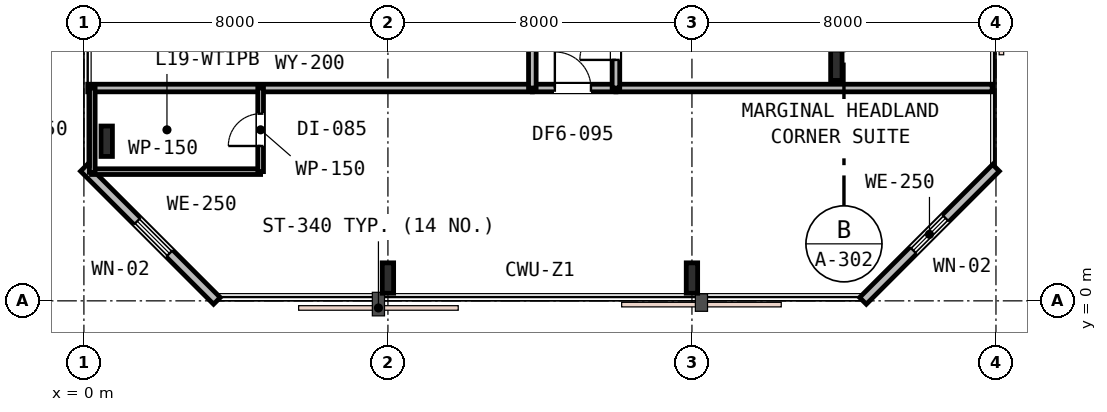
"""IFC4 building model, lengths in metres.
Left out: names, types, materials, properties, quantities, classifications, styles, units other than length and angle.
Written with IfcOpenShell. Run it as: python <this file> out.ifc"""

import sys

from ifc_helpers import new_model, si_unit, direction, frame, frame_2d, origin, origin_2d, place, context, subcontext, project, spatial, rectangle, i_section, extrude, element, fill, save


model = new_model("IFC4")
c1 = context("Model", 3, precision=1e-05, world=origin(), true_north=direction((0.0, 1.0)))
c2 = subcontext(c1, "Body", "Model", "MODEL_VIEW")
j1 = project(units=[si_unit("LENGTHUNIT", "METRE"), si_unit("PLANEANGLEUNIT", "RADIAN")], contexts=[c1])
p1 = place(None, origin())
s1 = spatial("IfcSite", under=j1, at=p1, CompositionType="ELEMENT")
p2 = place(p1, origin())
s2 = spatial("IfcBuilding", under=s1, at=p2, CompositionType="ELEMENT")
p3 = place(p2, frame((0.0, 0.0, 76.2)))
s3 = spatial("IfcBuildingStorey", under=s2, at=p3, CompositionType="ELEMENT", Elevation=76.2)
for number, where, z_axis, x_axis in (
    (1, (0.6, 4.2, 0.0), (0.0, 0.0, 1.0), (1.0, 0.0, 0.0)),
    (2, (8.0, 0.6, 0.0), (0.0, 0.0, 1.0), (1.0, 0.0, 0.0)),
    (3, (16.0, 0.6, 0.0), (0.0, 0.0, 1.0), (1.0, 0.0, 0.0)),
    (4, (19.8, 6.2, 0.0), (0.0, 0.0, 1.0), (1.0, 0.0, 0.0)),
):
    element("IfcColumn", number, at=place(p3, frame(where, z_axis=z_axis, x_axis=x_axis)), inside=s3, PredefinedType="COLUMN", context=c2, shape_type="SweptSolid", body=[
        extrude(i_section(OverallWidth=0.3, OverallDepth=0.8, WebThickness=0.018, FlangeThickness=0.033, FilletRadius=0.03, at=origin_2d()), origin(), (0.0, 0.0, 1.0), 3.6),
    ])
p4 = place(p3, frame((20.5, 0.0, 0.0), z_axis=(0.0, 0.0, 1.0), x_axis=(0.707106781187, 0.707106781187, 0.0)))
e5 = element("IfcWall", 5, at=p4, inside=s3, PredefinedType="STANDARD", context=c2, shape_type="SweptSolid", body=[
    extrude(rectangle(XDim=4.95, YDim=0.25, at=frame_2d((2.475, 0.0))), origin(), (0.0, 0.0, 1.0), 3.24),
])
p5 = place(p4, frame((1.875, 0.0, 0.85)))
e6 = element("IfcOpeningElement", 6, at=p5, cuts=e5, PredefinedType="OPENING", context=c2, shape_type="SweptSolid", body=[
    extrude(rectangle(XDim=1.2, YDim=1.6, at=frame_2d((0.6, 0.8))), frame((0.0, 0.135, 0.0), z_axis=(0.0, -1.0, 0.0), x_axis=(1.0, 0.0, 0.0)), (0.0, 0.0, 1.0), 0.27),
])
p6 = place(p3, frame((0.0, 3.5, 0.0), z_axis=(0.0, 0.0, 1.0), x_axis=(0.707106781187, -0.707106781187, 0.0)))
e7 = element("IfcWall", 7, at=p6, inside=s3, PredefinedType="STANDARD", context=c2, shape_type="SweptSolid", body=[
    extrude(rectangle(XDim=4.95, YDim=0.25, at=frame_2d((2.475, 0.0))), origin(), (0.0, 0.0, 1.0), 3.24),
])
p7 = place(p6, frame((1.985, 0.0, 0.85)))
e8 = element("IfcOpeningElement", 8, at=p7, cuts=e7, PredefinedType="OPENING", context=c2, shape_type="SweptSolid", body=[
    extrude(rectangle(XDim=1.2, YDim=1.6, at=frame_2d((0.6, 0.8))), frame((0.0, 0.135, 0.0), z_axis=(0.0, -1.0, 0.0), x_axis=(1.0, 0.0, 0.0)), (0.0, 0.0, 1.0), 0.27),
])
p8 = place(p3, frame((0.1, 5.6, 0.0), z_axis=(0.0, 0.0, 1.0), x_axis=(1.0, 0.0, 0.0)))
e9 = element("IfcWall", 9, at=p8, inside=s3, PredefinedType="PARTITIONING", context=c2, shape_type="SweptSolid", body=[
    extrude(rectangle(XDim=11.7, YDim=0.2, at=frame_2d((5.85, 0.0))), origin(), (0.0, 0.0, 1.0), 2.83),
])
p9 = place(p3, frame((14.0, 5.6, 0.0), z_axis=(0.0, 0.0, 1.0), x_axis=(1.0, 0.0, 0.0)))
e10 = element("IfcWall", 10, at=p9, inside=s3, PredefinedType="PARTITIONING", context=c2, shape_type="SweptSolid", body=[
    extrude(rectangle(XDim=9.9, YDim=0.2, at=frame_2d((4.95, 0.0))), origin(), (0.0, 0.0, 1.0), 2.74),
])
p10 = place(p3, frame((11.8, 5.6, 0.0), z_axis=(0.0, 0.0, 1.0), x_axis=(1.0, 0.0, 0.0)))
e11 = element("IfcWall", 11, at=p10, inside=s3, PredefinedType="PARTITIONING", context=c2, shape_type="SweptSolid", body=[
    extrude(rectangle(XDim=2.2, YDim=0.2, at=frame_2d((1.1, 0.0))), origin(), (0.0, 0.0, 1.0), 3.24),
])
p11 = place(p10, frame((0.593, 0.0, 0.0)))
e12 = element("IfcOpeningElement", 12, at=p11, cuts=e11, PredefinedType="OPENING", context=c2, shape_type="SweptSolid", body=[
    extrude(rectangle(XDim=0.95, YDim=2.15, at=frame_2d((0.475, 1.075))), frame((0.0, 0.11, 0.0), z_axis=(0.0, -1.0, 0.0), x_axis=(1.0, 0.0, 0.0)), (0.0, 0.0, 1.0), 0.22),
])
p12 = place(p3, frame((0.2, 3.4, 0.0), z_axis=(0.0, 0.0, 1.0), x_axis=(1.0, 0.0, 0.0)))
e13 = element("IfcWall", 13, at=p12, inside=s3, PredefinedType="PARTITIONING", context=c2, shape_type="SweptSolid", body=[
    extrude(rectangle(XDim=4.45, YDim=0.15, at=frame_2d((2.225, 0.0))), origin(), (0.0, 0.0, 1.0), 3.24),
])
p13 = place(p3, frame((4.65, 3.4, 0.0), z_axis=(0.0, 0.0, 1.0), x_axis=(0.0, 1.0, 0.0)))
e14 = element("IfcWall", 14, at=p13, inside=s3, PredefinedType="PARTITIONING", context=c2, shape_type="SweptSolid", body=[
    extrude(rectangle(XDim=2.2, YDim=0.15, at=frame_2d((1.1, 0.0))), origin(), (0.0, 0.0, 1.0), 3.24),
])
p14 = place(p13, frame((0.675, 0.0, 0.0)))
e15 = element("IfcOpeningElement", 15, at=p14, cuts=e14, PredefinedType="OPENING", context=c2, shape_type="SweptSolid", body=[
    extrude(rectangle(XDim=0.85, YDim=2.15, at=frame_2d((0.425, 1.075))), frame((0.0, 0.085, 0.0), z_axis=(0.0, -1.0, 0.0), x_axis=(1.0, 0.0, 0.0)), (0.0, 0.0, 1.0), 0.17),
])
p15 = place(p3, frame((0.22, 3.38, 0.0), z_axis=(0.0, 0.0, 1.0), x_axis=(0.0, 1.0, 0.0)))
e16 = element("IfcWall", 16, at=p15, inside=s3, PredefinedType="PARTITIONING", context=c2, shape_type="SweptSolid", body=[
    extrude(rectangle(XDim=2.22, YDim=0.15, at=frame_2d((1.11, 0.0))), origin(), (0.0, 0.0, 1.0), 2.83),
])
p16 = place(p3, frame((11.8, 5.6, 0.0), z_axis=(0.0, 0.0, 1.0), x_axis=(0.0, 1.0, 0.0)))
e17 = element("IfcWall", 17, at=p16, inside=s3, PredefinedType="PARTITIONING", context=c2, shape_type="SweptSolid", body=[
    extrude(rectangle(XDim=23.0, YDim=0.2, at=frame_2d((11.5, 0.0))), origin(), (0.0, 0.0, 1.0), 2.74),
])
p17 = place(p16, frame((1.2, 0.0, 0.0)))
e18 = element("IfcOpeningElement", 18, at=p17, cuts=e17, PredefinedType="OPENING", context=c2, shape_type="SweptSolid", body=[
    extrude(rectangle(XDim=0.95, YDim=2.15, at=frame_2d((0.475, 1.075))), frame((0.0, 0.11, 0.0), z_axis=(0.0, -1.0, 0.0), x_axis=(1.0, 0.0, 0.0)), (0.0, 0.0, 1.0), 0.22),
])
p18 = place(p16, frame((7.0, 0.0, 0.0)))
e19 = element("IfcOpeningElement", 19, at=p18, cuts=e17, PredefinedType="OPENING", context=c2, shape_type="SweptSolid", body=[
    extrude(rectangle(XDim=0.95, YDim=2.15, at=frame_2d((0.475, 1.075))), frame((0.0, 0.11, 0.0), z_axis=(0.0, -1.0, 0.0), x_axis=(1.0, 0.0, 0.0)), (0.0, 0.0, 1.0), 0.22),
])
p19 = place(p16, frame((12.8, 0.0, 0.0)))
e20 = element("IfcOpeningElement", 20, at=p19, cuts=e17, PredefinedType="OPENING", context=c2, shape_type="SweptSolid", body=[
    extrude(rectangle(XDim=0.95, YDim=2.15, at=frame_2d((0.475, 1.075))), frame((0.0, 0.11, 0.0), z_axis=(0.0, -1.0, 0.0), x_axis=(1.0, 0.0, 0.0)), (0.0, 0.0, 1.0), 0.22),
])
p20 = place(p16, frame((18.515, 0.0, 0.0)))
e21 = element("IfcOpeningElement", 21, at=p20, cuts=e17, PredefinedType="OPENING", context=c2, shape_type="SweptSolid", body=[
    extrude(rectangle(XDim=0.95, YDim=2.15, at=frame_2d((0.475, 1.075))), frame((0.0, 0.11, 0.0), z_axis=(0.0, -1.0, 0.0), x_axis=(1.0, 0.0, 0.0)), (0.0, 0.0, 1.0), 0.22),
])
p21 = place(p3, frame((14.0, 5.6, 0.0), z_axis=(0.0, 0.0, 1.0), x_axis=(0.0, 1.0, 0.0)))
e22 = element("IfcWall", 22, at=p21, inside=s3, PredefinedType="PARTITIONING", context=c2, shape_type="SweptSolid", body=[
    extrude(rectangle(XDim=23.0, YDim=0.2, at=frame_2d((11.5, 0.0))), origin(), (0.0, 0.0, 1.0), 2.74),
])
p22 = place(p21, frame((0.74, 0.0, 0.0)))
e23 = element("IfcOpeningElement", 23, at=p22, cuts=e22, PredefinedType="OPENING", context=c2, shape_type="SweptSolid", body=[
    extrude(rectangle(XDim=0.95, YDim=2.15, at=frame_2d((0.475, 1.075))), frame((0.0, 0.11, 0.0), z_axis=(0.0, -1.0, 0.0), x_axis=(1.0, 0.0, 0.0)), (0.0, 0.0, 1.0), 0.22),
])
p23 = place(p21, frame((6.271, 0.0, 0.0)))
e24 = element("IfcOpeningElement", 24, at=p23, cuts=e22, PredefinedType="OPENING", context=c2, shape_type="SweptSolid", body=[
    extrude(rectangle(XDim=0.95, YDim=2.15, at=frame_2d((0.475, 1.075))), frame((0.0, 0.11, 0.0), z_axis=(0.0, -1.0, 0.0), x_axis=(1.0, 0.0, 0.0)), (0.0, 0.0, 1.0), 0.22),
])
p24 = place(p21, frame((13.626, 0.0, 0.0)))
e25 = element("IfcOpeningElement", 25, at=p24, cuts=e22, PredefinedType="OPENING", context=c2, shape_type="SweptSolid", body=[
    extrude(rectangle(XDim=0.95, YDim=2.15, at=frame_2d((0.475, 1.075))), frame((0.0, 0.11, 0.0), z_axis=(0.0, -1.0, 0.0), x_axis=(1.0, 0.0, 0.0)), (0.0, 0.0, 1.0), 0.22),
])
p25 = place(p21, frame((20.393, 0.0, 0.0)))
e26 = element("IfcOpeningElement", 26, at=p25, cuts=e22, PredefinedType="OPENING", context=c2, shape_type="SweptSolid", body=[
    extrude(rectangle(XDim=0.95, YDim=2.15, at=frame_2d((0.475, 1.075))), frame((0.0, 0.11, 0.0), z_axis=(0.0, -1.0, 0.0), x_axis=(1.0, 0.0, 0.0)), (0.0, 0.0, 1.0), 0.22),
])
p26 = place(p5, origin())
e27 = element("IfcWindow", 27, at=p26, inside=s3, PartitioningType="SINGLE_PANEL", PredefinedType="WINDOW", context=c2, shape_type="SweptSolid", body=[
    extrude(rectangle(XDim=1.2, YDim=1.6, at=frame_2d((0.6, 0.8))), frame((0.0, 0.03, 0.0), z_axis=(0.0, -1.0, 0.0), x_axis=(1.0, 0.0, 0.0)), (0.0, 0.0, 1.0), 0.06),
])
fill(e6, e27)
p27 = place(p7, origin())
e28 = element("IfcWindow", 28, at=p27, inside=s3, PartitioningType="SINGLE_PANEL", PredefinedType="WINDOW", context=c2, shape_type="SweptSolid", body=[
    extrude(rectangle(XDim=1.2, YDim=1.6, at=frame_2d((0.6, 0.8))), frame((0.0, 0.03, 0.0), z_axis=(0.0, -1.0, 0.0), x_axis=(1.0, 0.0, 0.0)), (0.0, 0.0, 1.0), 0.06),
])
fill(e8, e28)
p28 = place(p11, origin())
e29 = element("IfcDoor", 29, at=p28, inside=s3, OperationType="SINGLE_SWING_LEFT", PredefinedType="DOOR", context=c2, shape_type="SweptSolid", body=[
    extrude(rectangle(XDim=0.95, YDim=2.15, at=frame_2d((0.475, 1.075))), frame((0.0, 0.025, 0.0), z_axis=(0.0, -1.0, 0.0), x_axis=(1.0, 0.0, 0.0)), (0.0, 0.0, 1.0), 0.05),
])
fill(e12, e29)
p29 = place(p14, origin())
e30 = element("IfcDoor", 30, at=p29, inside=s3, OperationType="SINGLE_SWING_LEFT", PredefinedType="DOOR", context=c2, shape_type="SweptSolid", body=[
    extrude(rectangle(XDim=0.85, YDim=2.15, at=frame_2d((0.425, 1.075))), frame((0.0, 0.025, 0.0), z_axis=(0.0, -1.0, 0.0), x_axis=(1.0, 0.0, 0.0)), (0.0, 0.0, 1.0), 0.05),
])
fill(e15, e30)
p30 = place(p22, origin())
e31 = element("IfcDoor", 31, at=p30, inside=s3, OperationType="SINGLE_SWING_LEFT", PredefinedType="DOOR", context=c2, shape_type="SweptSolid", body=[
    extrude(rectangle(XDim=0.95, YDim=2.15, at=frame_2d((0.475, 1.075))), frame((0.0, 0.025, 0.0), z_axis=(0.0, -1.0, 0.0), x_axis=(1.0, 0.0, 0.0)), (0.0, 0.0, 1.0), 0.05),
])
fill(e23, e31)
save(model, sys.argv[1])
